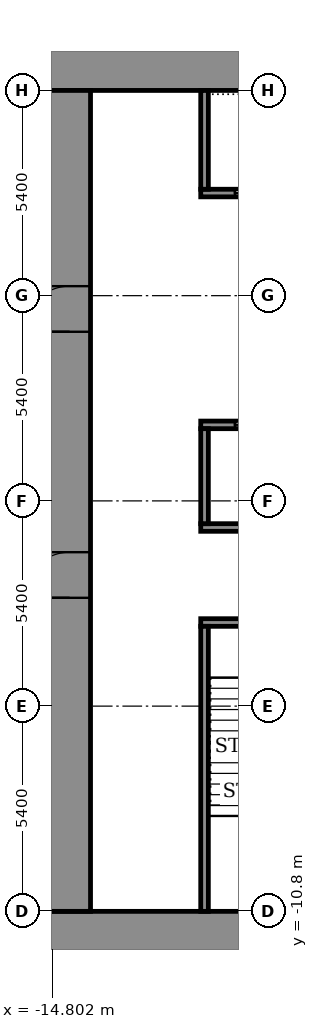
"""IFC4 building model, lengths in metres.
Left out: names, types, materials, properties, quantities, classifications, styles, units other than length and angle.
Written with IfcOpenShell. Run it as: python <this file> out.ifc"""

import sys

from ifc_helpers import new_model, si_unit, direction, frame, frame_2d, origin, place, context, subcontext, project, spatial, rectangle, extrude, element, fill, save


model = new_model("IFC4")
c1 = context("Model", 3, precision=1e-05, world=origin(), true_north=direction((0.0, 1.0)))
c2 = subcontext(c1, "Body", "Model", "MODEL_VIEW")
j1 = project(units=[si_unit("LENGTHUNIT", "METRE"), si_unit("PLANEANGLEUNIT", "RADIAN")], contexts=[c1])
p1 = place(None, origin())
s1 = spatial("IfcSite", under=j1, at=p1, CompositionType="ELEMENT")
p2 = place(p1, origin())
s2 = spatial("IfcBuilding", under=s1, at=p2, CompositionType="ELEMENT")
p3 = place(p2, frame((0.0, 0.0, 52.1)))
s3 = spatial("IfcBuildingStorey", under=s2, at=p3, CompositionType="ELEMENT", Elevation=52.1)
for number, where, z_axis, x_axis in (
    (1, (-14.9, -11.35, 0.0), (0.0, 0.0, 1.0), (1.0, 0.0, 0.0)),
    (2, (-14.9, 11.35, 0.0), (0.0, 0.0, 1.0), (1.0, 0.0, 0.0)),
):
    element("IfcWall", number, at=place(p3, frame(where, z_axis=z_axis, x_axis=x_axis)), inside=s3, PredefinedType="SHEAR", context=c2, shape_type="SweptSolid", body=[
        extrude(rectangle(XDim=29.8, YDim=1.1, at=frame_2d((14.9, 0.0))), origin(), (0.0, 0.0, 1.0), 4.6),
    ])
p4 = place(p3, frame((-14.35, -10.8, 0.0), z_axis=(0.0, 0.0, 1.0), x_axis=(0.0, 1.0, 0.0)))
e3 = element("IfcWall", 3, at=p4, inside=s3, PredefinedType="SHEAR", context=c2, shape_type="SweptSolid", body=[
    extrude(rectangle(XDim=21.6, YDim=1.1, at=frame_2d((10.8, 0.0))), origin(), (0.0, 0.0, 1.0), 4.6),
])
p5 = place(p4, frame((8.25, 0.0, 0.0)))
e4 = element("IfcOpeningElement", 4, at=p5, cuts=e3, PredefinedType="OPENING", context=c2, shape_type="SweptSolid", body=[
    extrude(rectangle(XDim=1.2, YDim=2.1, at=frame_2d((0.6, 1.05))), frame((0.0, 0.56, 0.0), z_axis=(0.0, -1.0, 0.0), x_axis=(1.0, 0.0, 0.0)), (0.0, 0.0, 1.0), 1.12),
])
p6 = place(p4, frame((15.25, 0.0, 0.0)))
e5 = element("IfcOpeningElement", 5, at=p6, cuts=e3, PredefinedType="OPENING", context=c2, shape_type="SweptSolid", body=[
    extrude(rectangle(XDim=1.2, YDim=2.1, at=frame_2d((0.6, 1.05))), frame((0.0, 0.56, 0.0), z_axis=(0.0, -1.0, 0.0), x_axis=(1.0, 0.0, 0.0)), (0.0, 0.0, 1.0), 1.12),
])
p7 = place(p3, frame((-10.9, -3.2, 0.0), z_axis=(0.0, 0.0, 1.0), x_axis=(1.0, 0.0, 0.0)))
e6 = element("IfcWall", 6, at=p7, inside=s3, PredefinedType="SHEAR", context=c2, shape_type="SweptSolid", body=[
    extrude(rectangle(XDim=21.8, YDim=0.2, at=frame_2d((10.9, 0.0))), origin(), (0.0, 0.0, 1.0), 4.05),
])
p8 = place(p7, frame((1.075, 0.0, 0.0)))
e7 = element("IfcOpeningElement", 7, at=p8, cuts=e6, PredefinedType="OPENING", context=c2, shape_type="SweptSolid", body=[
    extrude(rectangle(XDim=1.1, YDim=2.1, at=frame_2d((0.55, 1.05))), frame((0.0, 0.11, 0.0), z_axis=(0.0, -1.0, 0.0), x_axis=(1.0, 0.0, 0.0)), (0.0, 0.0, 1.0), 0.22),
])
p9 = place(p7, frame((10.325, 0.0, 0.0)))
e8 = element("IfcOpeningElement", 8, at=p9, cuts=e6, PredefinedType="OPENING", context=c2, shape_type="SweptSolid", body=[
    extrude(rectangle(XDim=1.1, YDim=2.1, at=frame_2d((0.55, 1.05))), frame((0.0, 0.11, 0.0), z_axis=(0.0, -1.0, 0.0), x_axis=(1.0, 0.0, 0.0)), (0.0, 0.0, 1.0), 0.22),
])
p10 = place(p7, frame((19.625, 0.0, 0.0)))
e9 = element("IfcOpeningElement", 9, at=p10, cuts=e6, PredefinedType="OPENING", context=c2, shape_type="SweptSolid", body=[
    extrude(rectangle(XDim=1.1, YDim=2.1, at=frame_2d((0.55, 1.05))), frame((0.0, 0.11, 0.0), z_axis=(0.0, -1.0, 0.0), x_axis=(1.0, 0.0, 0.0)), (0.0, 0.0, 1.0), 0.22),
])
p11 = place(p7, frame((5.7, 0.0, 0.0)))
e10 = element("IfcOpeningElement", 10, at=p11, cuts=e6, PredefinedType="OPENING", context=c2, shape_type="SweptSolid", body=[
    extrude(rectangle(XDim=1.1, YDim=2.1, at=frame_2d((0.55, 1.05))), frame((0.0, 0.11, 0.0), z_axis=(0.0, -1.0, 0.0), x_axis=(1.0, 0.0, 0.0)), (0.0, 0.0, 1.0), 0.22),
])
p12 = place(p7, frame((14.975, 0.0, 0.0)))
e11 = element("IfcOpeningElement", 11, at=p12, cuts=e6, PredefinedType="OPENING", context=c2, shape_type="SweptSolid", body=[
    extrude(rectangle(XDim=1.1, YDim=2.1, at=frame_2d((0.55, 1.05))), frame((0.0, 0.11, 0.0), z_axis=(0.0, -1.0, 0.0), x_axis=(1.0, 0.0, 0.0)), (0.0, 0.0, 1.0), 0.22),
])
p13 = place(p3, frame((-10.9, -0.7, 0.0), z_axis=(0.0, 0.0, 1.0), x_axis=(1.0, 0.0, 0.0)))
e12 = element("IfcWall", 12, at=p13, inside=s3, PredefinedType="SHEAR", context=c2, shape_type="SweptSolid", body=[
    extrude(rectangle(XDim=21.8, YDim=0.2, at=frame_2d((10.9, 0.0))), origin(), (0.0, 0.0, 1.0), 4.05),
])
p14 = place(p3, frame((-10.9, 2.0, 0.0), z_axis=(0.0, 0.0, 1.0), x_axis=(1.0, 0.0, 0.0)))
e13 = element("IfcWall", 13, at=p14, inside=s3, PredefinedType="SHEAR", context=c2, shape_type="SweptSolid", body=[
    extrude(rectangle(XDim=21.8, YDim=0.2, at=frame_2d((10.9, 0.0))), origin(), (0.0, 0.0, 1.0), 4.05),
])
p15 = place(p14, frame((0.9, 0.0, 0.0)))
e14 = element("IfcOpeningElement", 14, at=p15, cuts=e13, PredefinedType="OPENING", context=c2, shape_type="SweptSolid", body=[
    extrude(rectangle(XDim=1.1, YDim=2.1, at=frame_2d((0.55, 1.05))), frame((0.0, 0.11, 0.0), z_axis=(0.0, -1.0, 0.0), x_axis=(1.0, 0.0, 0.0)), (0.0, 0.0, 1.0), 0.22),
])
p16 = place(p14, frame((3.6, 0.0, 0.0)))
e15 = element("IfcOpeningElement", 15, at=p16, cuts=e13, PredefinedType="OPENING", context=c2, shape_type="SweptSolid", body=[
    extrude(rectangle(XDim=1.1, YDim=2.1, at=frame_2d((0.55, 1.05))), frame((0.0, 0.11, 0.0), z_axis=(0.0, -1.0, 0.0), x_axis=(1.0, 0.0, 0.0)), (0.0, 0.0, 1.0), 0.22),
])
p17 = place(p14, frame((6.3, 0.0, 0.0)))
e16 = element("IfcOpeningElement", 16, at=p17, cuts=e13, PredefinedType="OPENING", context=c2, shape_type="SweptSolid", body=[
    extrude(rectangle(XDim=1.1, YDim=2.1, at=frame_2d((0.55, 1.05))), frame((0.0, 0.11, 0.0), z_axis=(0.0, -1.0, 0.0), x_axis=(1.0, 0.0, 0.0)), (0.0, 0.0, 1.0), 0.22),
])
p18 = place(p14, frame((9.0, 0.0, 0.0)))
e17 = element("IfcOpeningElement", 17, at=p18, cuts=e13, PredefinedType="OPENING", context=c2, shape_type="SweptSolid", body=[
    extrude(rectangle(XDim=1.1, YDim=2.1, at=frame_2d((0.55, 1.05))), frame((0.0, 0.11, 0.0), z_axis=(0.0, -1.0, 0.0), x_axis=(1.0, 0.0, 0.0)), (0.0, 0.0, 1.0), 0.22),
])
p19 = place(p14, frame((11.7, 0.0, 0.0)))
e18 = element("IfcOpeningElement", 18, at=p19, cuts=e13, PredefinedType="OPENING", context=c2, shape_type="SweptSolid", body=[
    extrude(rectangle(XDim=1.1, YDim=2.1, at=frame_2d((0.55, 1.05))), frame((0.0, 0.11, 0.0), z_axis=(0.0, -1.0, 0.0), x_axis=(1.0, 0.0, 0.0)), (0.0, 0.0, 1.0), 0.22),
])
p20 = place(p14, frame((14.5, 0.0, 0.0)))
e19 = element("IfcOpeningElement", 19, at=p20, cuts=e13, PredefinedType="OPENING", context=c2, shape_type="SweptSolid", body=[
    extrude(rectangle(XDim=0.9, YDim=2.1, at=frame_2d((0.45, 1.05))), frame((0.0, 0.11, 0.0), z_axis=(0.0, -1.0, 0.0), x_axis=(1.0, 0.0, 0.0)), (0.0, 0.0, 1.0), 0.22),
])
p21 = place(p14, frame((18.55, 0.0, 0.0)))
e20 = element("IfcOpeningElement", 20, at=p21, cuts=e13, PredefinedType="OPENING", context=c2, shape_type="SweptSolid", body=[
    extrude(rectangle(XDim=0.9, YDim=2.1, at=frame_2d((0.45, 1.05))), frame((0.0, 0.11, 0.0), z_axis=(0.0, -1.0, 0.0), x_axis=(1.0, 0.0, 0.0)), (0.0, 0.0, 1.0), 0.22),
])
p22 = place(p3, frame((-10.9, 8.1, 0.0), z_axis=(0.0, 0.0, 1.0), x_axis=(1.0, 0.0, 0.0)))
e21 = element("IfcWall", 21, at=p22, inside=s3, PredefinedType="SHEAR", context=c2, shape_type="SweptSolid", body=[
    extrude(rectangle(XDim=21.8, YDim=0.2, at=frame_2d((10.9, 0.0))), origin(), (0.0, 0.0, 1.0), 4.05),
])
p23 = place(p22, frame((0.9, 0.0, 0.0)))
e22 = element("IfcOpeningElement", 22, at=p23, cuts=e21, PredefinedType="OPENING", context=c2, shape_type="SweptSolid", body=[
    extrude(rectangle(XDim=1.1, YDim=2.1, at=frame_2d((0.55, 1.05))), frame((0.0, 0.11, 0.0), z_axis=(0.0, -1.0, 0.0), x_axis=(1.0, 0.0, 0.0)), (0.0, 0.0, 1.0), 0.22),
])
p24 = place(p22, frame((3.6, 0.0, 0.0)))
e23 = element("IfcOpeningElement", 23, at=p24, cuts=e21, PredefinedType="OPENING", context=c2, shape_type="SweptSolid", body=[
    extrude(rectangle(XDim=1.1, YDim=2.1, at=frame_2d((0.55, 1.05))), frame((0.0, 0.11, 0.0), z_axis=(0.0, -1.0, 0.0), x_axis=(1.0, 0.0, 0.0)), (0.0, 0.0, 1.0), 0.22),
])
p25 = place(p22, frame((6.3, 0.0, 0.0)))
e24 = element("IfcOpeningElement", 24, at=p25, cuts=e21, PredefinedType="OPENING", context=c2, shape_type="SweptSolid", body=[
    extrude(rectangle(XDim=1.1, YDim=2.1, at=frame_2d((0.55, 1.05))), frame((0.0, 0.11, 0.0), z_axis=(0.0, -1.0, 0.0), x_axis=(1.0, 0.0, 0.0)), (0.0, 0.0, 1.0), 0.22),
])
p26 = place(p22, frame((9.0, 0.0, 0.0)))
e25 = element("IfcOpeningElement", 25, at=p26, cuts=e21, PredefinedType="OPENING", context=c2, shape_type="SweptSolid", body=[
    extrude(rectangle(XDim=1.1, YDim=2.1, at=frame_2d((0.55, 1.05))), frame((0.0, 0.11, 0.0), z_axis=(0.0, -1.0, 0.0), x_axis=(1.0, 0.0, 0.0)), (0.0, 0.0, 1.0), 0.22),
])
p27 = place(p22, frame((11.7, 0.0, 0.0)))
e26 = element("IfcOpeningElement", 26, at=p27, cuts=e21, PredefinedType="OPENING", context=c2, shape_type="SweptSolid", body=[
    extrude(rectangle(XDim=1.1, YDim=2.1, at=frame_2d((0.55, 1.05))), frame((0.0, 0.11, 0.0), z_axis=(0.0, -1.0, 0.0), x_axis=(1.0, 0.0, 0.0)), (0.0, 0.0, 1.0), 0.22),
])
p28 = place(p22, frame((14.5, 0.0, 0.0)))
e27 = element("IfcOpeningElement", 27, at=p28, cuts=e21, PredefinedType="OPENING", context=c2, shape_type="SweptSolid", body=[
    extrude(rectangle(XDim=0.9, YDim=2.1, at=frame_2d((0.45, 1.05))), frame((0.0, 0.11, 0.0), z_axis=(0.0, -1.0, 0.0), x_axis=(1.0, 0.0, 0.0)), (0.0, 0.0, 1.0), 0.22),
])
p29 = place(p22, frame((18.55, 0.0, 0.0)))
e28 = element("IfcOpeningElement", 28, at=p29, cuts=e21, PredefinedType="OPENING", context=c2, shape_type="SweptSolid", body=[
    extrude(rectangle(XDim=0.9, YDim=2.1, at=frame_2d((0.45, 1.05))), frame((0.0, 0.11, 0.0), z_axis=(0.0, -1.0, 0.0), x_axis=(1.0, 0.0, 0.0)), (0.0, 0.0, 1.0), 0.22),
])
p30 = place(p3, frame((-10.8, -10.8, 0.0), z_axis=(0.0, 0.0, 1.0), x_axis=(0.0, 1.0, 0.0)))
e29 = element("IfcWall", 29, at=p30, inside=s3, PredefinedType="SHEAR", context=c2, shape_type="SweptSolid", body=[
    extrude(rectangle(XDim=7.5, YDim=0.2, at=frame_2d((3.75, 0.0))), origin(), (0.0, 0.0, 1.0), 4.05),
])
p31 = place(p3, frame((-10.8, -0.6, 0.0), z_axis=(0.0, 0.0, 1.0), x_axis=(0.0, 1.0, 0.0)))
e30 = element("IfcWall", 30, at=p31, inside=s3, PredefinedType="SHEAR", context=c2, shape_type="SweptSolid", body=[
    extrude(rectangle(XDim=2.5, YDim=0.2, at=frame_2d((1.25, 0.0))), origin(), (0.0, 0.0, 1.0), 4.05),
])
p32 = place(p3, frame((-10.8, 8.2, 0.0), z_axis=(0.0, 0.0, 1.0), x_axis=(0.0, 1.0, 0.0)))
e31 = element("IfcWall", 31, at=p32, inside=s3, PredefinedType="SHEAR", context=c2, shape_type="SweptSolid", body=[
    extrude(rectangle(XDim=2.6, YDim=0.2, at=frame_2d((1.3, 0.0))), origin(), (0.0, 0.0, 1.0), 4.05),
])
p33 = place(p5, origin())
e32 = element("IfcDoor", 32, at=p33, inside=s3, OperationType="DOUBLE_DOOR_SINGLE_SWING", PredefinedType="DOOR", context=c2, shape_type="SweptSolid", body=[
    extrude(rectangle(XDim=1.2, YDim=2.1, at=frame_2d((0.6, 1.05))), frame((0.0, 0.025, 0.0), z_axis=(0.0, -1.0, 0.0), x_axis=(1.0, 0.0, 0.0)), (0.0, 0.0, 1.0), 0.05),
])
fill(e4, e32)
p34 = place(p6, origin())
e33 = element("IfcDoor", 33, at=p34, inside=s3, OperationType="DOUBLE_DOOR_SINGLE_SWING", PredefinedType="DOOR", context=c2, shape_type="SweptSolid", body=[
    extrude(rectangle(XDim=1.2, YDim=2.1, at=frame_2d((0.6, 1.05))), frame((0.0, 0.025, 0.0), z_axis=(0.0, -1.0, 0.0), x_axis=(1.0, 0.0, 0.0)), (0.0, 0.0, 1.0), 0.05),
])
fill(e5, e33)
p35 = place(p15, origin())
e34 = element("IfcDoor", 34, at=p35, inside=s3, OperationType="SLIDING_TO_LEFT", PredefinedType="DOOR", context=c2, shape_type="SweptSolid", body=[
    extrude(rectangle(XDim=1.1, YDim=2.1, at=frame_2d((0.55, 1.05))), frame((0.0, 0.025, 0.0), z_axis=(0.0, -1.0, 0.0), x_axis=(1.0, 0.0, 0.0)), (0.0, 0.0, 1.0), 0.05),
])
fill(e14, e34)
p36 = place(p23, origin())
e35 = element("IfcDoor", 35, at=p36, inside=s3, OperationType="SLIDING_TO_LEFT", PredefinedType="DOOR", context=c2, shape_type="SweptSolid", body=[
    extrude(rectangle(XDim=1.1, YDim=2.1, at=frame_2d((0.55, 1.05))), frame((0.0, 0.025, 0.0), z_axis=(0.0, -1.0, 0.0), x_axis=(1.0, 0.0, 0.0)), (0.0, 0.0, 1.0), 0.05),
])
fill(e22, e35)
save(model, sys.argv[1])
